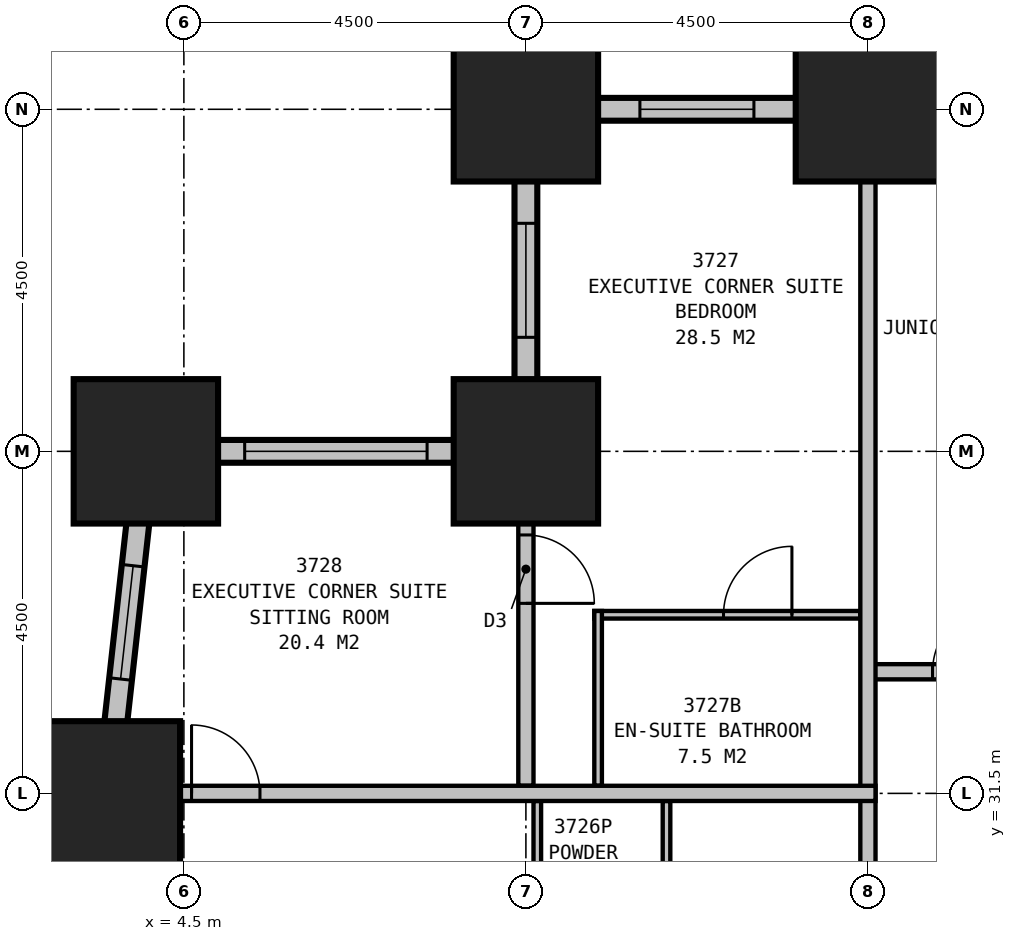
"""IFC4 building model, lengths in metres.
Left out: names, types, materials, properties, quantities, classifications, styles, units other than length and angle.
Written with IfcOpenShell. Run it as: python <this file> out.ifc"""

import sys

from ifc_helpers import new_model, si_unit, direction, frame, frame_2d, origin, origin_2d, place, context, subcontext, project, spatial, rectangle, extrude, element, fill, save


model = new_model("IFC4")
c1 = context("Model", 3, precision=1e-05, world=origin(), true_north=direction((0.0, 1.0)))
c2 = subcontext(c1, "Body", "Model", "MODEL_VIEW")
j1 = project(units=[si_unit("LENGTHUNIT", "METRE"), si_unit("PLANEANGLEUNIT", "RADIAN")], contexts=[c1])
p1 = place(None, origin())
s1 = spatial("IfcSite", under=j1, at=p1, CompositionType="ELEMENT")
p2 = place(p1, origin())
s2 = spatial("IfcBuilding", under=s1, at=p2, CompositionType="ELEMENT")
p3 = place(p2, frame((0.0, 0.0, 142.4)))
s3 = spatial("IfcBuildingStorey", under=s2, at=p3, CompositionType="ELEMENT", Elevation=142.4)
for number, where, z_axis, x_axis in (
    (1, (13.5, 40.5, 0.0), (0.0, 0.0, 1.0), (1.0, 0.0, 0.0)),
    (2, (9.0, 40.5, 0.0), (0.0, 0.0, 1.0), (1.0, 0.0, 0.0)),
    (3, (9.0, 36.0, 0.0), (0.0, 0.0, 1.0), (1.0, 0.0, 0.0)),
    (4, (4.0, 36.0, 0.0), (0.0, 0.0, 1.0), (1.0, 0.0, 0.0)),
    (5, (3.5, 31.5, 0.0), (0.0, 0.0, 1.0), (1.0, 0.0, 0.0)),
):
    element("IfcColumn", number, at=place(p3, frame(where, z_axis=z_axis, x_axis=x_axis)), inside=s3, PredefinedType="COLUMN", context=c2, shape_type="SweptSolid", body=[
        extrude(rectangle(XDim=1.9, YDim=1.9, at=origin_2d()), origin(), (0.0, 0.0, 1.0), 3.5),
    ])
p4 = place(p3, frame((40.65, 40.5, 0.0), z_axis=(0.0, 0.0, 1.0), x_axis=(-1.0, 0.0, 0.0)))
e6 = element("IfcWall", 6, at=p4, inside=s3, PredefinedType="STANDARD", context=c2, shape_type="SweptSolid", body=[
    extrude(rectangle(XDim=31.8, YDim=0.3, at=frame_2d((15.9, 0.0))), origin(), (0.0, 0.0, 1.0), 2.1),
])
p5 = place(p4, frame((1.65, 0.0, 0.5)))
e7 = element("IfcOpeningElement", 7, at=p5, cuts=e6, PredefinedType="OPENING", context=c2, shape_type="SweptSolid", body=[
    extrude(rectangle(XDim=1.5, YDim=1.4, at=frame_2d((0.75, 0.7))), frame((0.0, 0.16, 0.0), z_axis=(0.0, -1.0, 0.0), x_axis=(1.0, 0.0, 0.0)), (0.0, 0.0, 1.0), 0.32),
])
p6 = place(p4, frame((6.15, 0.0, 0.5)))
e8 = element("IfcOpeningElement", 8, at=p6, cuts=e6, PredefinedType="OPENING", context=c2, shape_type="SweptSolid", body=[
    extrude(rectangle(XDim=1.5, YDim=1.4, at=frame_2d((0.75, 0.7))), frame((0.0, 0.16, 0.0), z_axis=(0.0, -1.0, 0.0), x_axis=(1.0, 0.0, 0.0)), (0.0, 0.0, 1.0), 0.32),
])
p7 = place(p4, frame((10.65, 0.0, 0.5)))
e9 = element("IfcOpeningElement", 9, at=p7, cuts=e6, PredefinedType="OPENING", context=c2, shape_type="SweptSolid", body=[
    extrude(rectangle(XDim=1.5, YDim=1.4, at=frame_2d((0.75, 0.7))), frame((0.0, 0.16, 0.0), z_axis=(0.0, -1.0, 0.0), x_axis=(1.0, 0.0, 0.0)), (0.0, 0.0, 1.0), 0.32),
])
p8 = place(p4, frame((15.15, 0.0, 0.5)))
e10 = element("IfcOpeningElement", 10, at=p8, cuts=e6, PredefinedType="OPENING", context=c2, shape_type="SweptSolid", body=[
    extrude(rectangle(XDim=1.5, YDim=1.4, at=frame_2d((0.75, 0.7))), frame((0.0, 0.16, 0.0), z_axis=(0.0, -1.0, 0.0), x_axis=(1.0, 0.0, 0.0)), (0.0, 0.0, 1.0), 0.32),
])
p9 = place(p4, frame((19.65, 0.0, 0.5)))
e11 = element("IfcOpeningElement", 11, at=p9, cuts=e6, PredefinedType="OPENING", context=c2, shape_type="SweptSolid", body=[
    extrude(rectangle(XDim=1.5, YDim=1.4, at=frame_2d((0.75, 0.7))), frame((0.0, 0.16, 0.0), z_axis=(0.0, -1.0, 0.0), x_axis=(1.0, 0.0, 0.0)), (0.0, 0.0, 1.0), 0.32),
])
p10 = place(p4, frame((24.15, 0.0, 0.5)))
e12 = element("IfcOpeningElement", 12, at=p10, cuts=e6, PredefinedType="OPENING", context=c2, shape_type="SweptSolid", body=[
    extrude(rectangle(XDim=1.5, YDim=1.4, at=frame_2d((0.75, 0.7))), frame((0.0, 0.16, 0.0), z_axis=(0.0, -1.0, 0.0), x_axis=(1.0, 0.0, 0.0)), (0.0, 0.0, 1.0), 0.32),
])
p11 = place(p4, frame((28.65, 0.0, 0.5)))
e13 = element("IfcOpeningElement", 13, at=p11, cuts=e6, PredefinedType="OPENING", context=c2, shape_type="SweptSolid", body=[
    extrude(rectangle(XDim=1.5, YDim=1.4, at=frame_2d((0.75, 0.7))), frame((0.0, 0.16, 0.0), z_axis=(0.0, -1.0, 0.0), x_axis=(1.0, 0.0, 0.0)), (0.0, 0.0, 1.0), 0.32),
])
p12 = place(p3, frame((9.0, 40.65, 0.0), z_axis=(0.0, 0.0, 1.0), x_axis=(0.0, -1.0, 0.0)))
e14 = element("IfcWall", 14, at=p12, inside=s3, PredefinedType="STANDARD", context=c2, shape_type="SweptSolid", body=[
    extrude(rectangle(XDim=4.8, YDim=0.3, at=frame_2d((2.4, 0.0))), origin(), (0.0, 0.0, 1.0), 2.1),
])
p13 = place(p12, frame((1.65, 0.0, 0.5)))
e15 = element("IfcOpeningElement", 15, at=p13, cuts=e14, PredefinedType="OPENING", context=c2, shape_type="SweptSolid", body=[
    extrude(rectangle(XDim=1.5, YDim=1.4, at=frame_2d((0.75, 0.7))), frame((0.0, 0.16, 0.0), z_axis=(0.0, -1.0, 0.0), x_axis=(1.0, 0.0, 0.0)), (0.0, 0.0, 1.0), 0.32),
])
p14 = place(p3, frame((9.15, 36.0, 0.0), z_axis=(0.0, 0.0, 1.0), x_axis=(-1.0, 0.0, 0.0)))
e16 = element("IfcWall", 16, at=p14, inside=s3, PredefinedType="STANDARD", context=c2, shape_type="SweptSolid", body=[
    extrude(rectangle(XDim=5.3, YDim=0.3, at=frame_2d((2.65, 0.0))), origin(), (0.0, 0.0, 1.0), 2.1),
])
p15 = place(p14, frame((1.45, 0.0, 0.5)))
e17 = element("IfcOpeningElement", 17, at=p15, cuts=e16, PredefinedType="OPENING", context=c2, shape_type="SweptSolid", body=[
    extrude(rectangle(XDim=2.4, YDim=1.4, at=frame_2d((1.2, 0.7))), frame((0.0, 0.16, 0.0), z_axis=(0.0, -1.0, 0.0), x_axis=(1.0, 0.0, 0.0)), (0.0, 0.0, 1.0), 0.32),
])
p16 = place(p3, frame((4.017, 36.149, 0.0), z_axis=(0.0, 0.0, 1.0), x_axis=(-0.110433201132, -0.993883548555, 0.0)))
e18 = element("IfcWall", 18, at=p16, inside=s3, PredefinedType="STANDARD", context=c2, shape_type="SweptSolid", body=[
    extrude(rectangle(XDim=31.994, YDim=0.3, at=frame_2d((15.997, 0.0))), origin(), (0.0, 0.0, 1.0), 2.1),
])
p17 = place(p16, frame((1.664, 0.0, 0.5)))
e19 = element("IfcOpeningElement", 19, at=p17, cuts=e18, PredefinedType="OPENING", context=c2, shape_type="SweptSolid", body=[
    extrude(rectangle(XDim=1.5, YDim=1.4, at=frame_2d((0.75, 0.7))), frame((0.0, 0.16, 0.0), z_axis=(0.0, -1.0, 0.0), x_axis=(1.0, 0.0, 0.0)), (0.0, 0.0, 1.0), 0.32),
])
p18 = place(p16, frame((6.192, 0.0, 0.5)))
e20 = element("IfcOpeningElement", 20, at=p18, cuts=e18, PredefinedType="OPENING", context=c2, shape_type="SweptSolid", body=[
    extrude(rectangle(XDim=1.5, YDim=1.4, at=frame_2d((0.75, 0.7))), frame((0.0, 0.16, 0.0), z_axis=(0.0, -1.0, 0.0), x_axis=(1.0, 0.0, 0.0)), (0.0, 0.0, 1.0), 0.32),
])
p19 = place(p16, frame((10.719, 0.0, 0.5)))
e21 = element("IfcOpeningElement", 21, at=p19, cuts=e18, PredefinedType="OPENING", context=c2, shape_type="SweptSolid", body=[
    extrude(rectangle(XDim=1.5, YDim=1.4, at=frame_2d((0.75, 0.7))), frame((0.0, 0.16, 0.0), z_axis=(0.0, -1.0, 0.0), x_axis=(1.0, 0.0, 0.0)), (0.0, 0.0, 1.0), 0.32),
])
p20 = place(p16, frame((15.247, 0.0, 0.5)))
e22 = element("IfcOpeningElement", 22, at=p20, cuts=e18, PredefinedType="OPENING", context=c2, shape_type="SweptSolid", body=[
    extrude(rectangle(XDim=1.5, YDim=1.4, at=frame_2d((0.75, 0.7))), frame((0.0, 0.16, 0.0), z_axis=(0.0, -1.0, 0.0), x_axis=(1.0, 0.0, 0.0)), (0.0, 0.0, 1.0), 0.32),
])
p21 = place(p16, frame((19.775, 0.0, 0.5)))
e23 = element("IfcOpeningElement", 23, at=p21, cuts=e18, PredefinedType="OPENING", context=c2, shape_type="SweptSolid", body=[
    extrude(rectangle(XDim=1.5, YDim=1.4, at=frame_2d((0.75, 0.7))), frame((0.0, 0.16, 0.0), z_axis=(0.0, -1.0, 0.0), x_axis=(1.0, 0.0, 0.0)), (0.0, 0.0, 1.0), 0.32),
])
p22 = place(p16, frame((24.302, 0.0, 0.5)))
e24 = element("IfcOpeningElement", 24, at=p22, cuts=e18, PredefinedType="OPENING", context=c2, shape_type="SweptSolid", body=[
    extrude(rectangle(XDim=1.5, YDim=1.4, at=frame_2d((0.75, 0.7))), frame((0.0, 0.16, 0.0), z_axis=(0.0, -1.0, 0.0), x_axis=(1.0, 0.0, 0.0)), (0.0, 0.0, 1.0), 0.32),
])
p23 = place(p16, frame((28.83, 0.0, 0.5)))
e25 = element("IfcOpeningElement", 25, at=p23, cuts=e18, PredefinedType="OPENING", context=c2, shape_type="SweptSolid", body=[
    extrude(rectangle(XDim=1.5, YDim=1.4, at=frame_2d((0.75, 0.7))), frame((0.0, 0.16, 0.0), z_axis=(0.0, -1.0, 0.0), x_axis=(1.0, 0.0, 0.0)), (0.0, 0.0, 1.0), 0.32),
])
p24 = place(p3, frame((13.5, 33.1, 0.0), z_axis=(0.0, 0.0, 1.0), x_axis=(1.0, 0.0, 0.0)))
e26 = element("IfcWall", 26, at=p24, inside=s3, PredefinedType="PARTITIONING", context=c2, shape_type="SweptSolid", body=[
    extrude(rectangle(XDim=22.5, YDim=0.2, at=frame_2d((11.25, 0.0))), origin(), (0.0, 0.0, 1.0), 3.25),
])
p25 = place(p24, frame((0.85, 0.0, 0.0)))
e27 = element("IfcOpeningElement", 27, at=p25, cuts=e26, PredefinedType="OPENING", context=c2, shape_type="SweptSolid", body=[
    extrude(rectangle(XDim=0.9, YDim=2.1, at=frame_2d((0.45, 1.05))), frame((0.0, 0.11, 0.0), z_axis=(0.0, -1.0, 0.0), x_axis=(1.0, 0.0, 0.0)), (0.0, 0.0, 1.0), 0.22),
])
p26 = place(p24, frame((10.7, 0.0, 0.0)))
e28 = element("IfcOpeningElement", 28, at=p26, cuts=e26, PredefinedType="OPENING", context=c2, shape_type="SweptSolid", body=[
    extrude(rectangle(XDim=1.0, YDim=2.1, at=frame_2d((0.5, 1.05))), frame((0.0, 0.11, 0.0), z_axis=(0.0, -1.0, 0.0), x_axis=(1.0, 0.0, 0.0)), (0.0, 0.0, 1.0), 0.22),
])
p27 = place(p24, frame((15.15, 0.0, 0.0)))
e29 = element("IfcOpeningElement", 29, at=p27, cuts=e26, PredefinedType="OPENING", context=c2, shape_type="SweptSolid", body=[
    extrude(rectangle(XDim=0.9, YDim=2.1, at=frame_2d((0.45, 1.05))), frame((0.0, 0.11, 0.0), z_axis=(0.0, -1.0, 0.0), x_axis=(1.0, 0.0, 0.0)), (0.0, 0.0, 1.0), 0.22),
])
p28 = place(p3, frame((13.5, 29.3, 0.0), z_axis=(0.0, 0.0, 1.0), x_axis=(0.0, 1.0, 0.0)))
e30 = element("IfcWall", 30, at=p28, inside=s3, PredefinedType="PARTITIONING", context=c2, shape_type="SweptSolid", body=[
    extrude(rectangle(XDim=11.2, YDim=0.2, at=frame_2d((5.6, 0.0))), origin(), (0.0, 0.0, 1.0), 2.2),
])
p29 = place(p3, frame((13.6, 31.5, 0.0), z_axis=(0.0, 0.0, 1.0), x_axis=(-1.0, 0.0, 0.0)))
e31 = element("IfcWall", 31, at=p29, inside=s3, PredefinedType="PARTITIONING", context=c2, shape_type="SweptSolid", body=[
    extrude(rectangle(XDim=10.099, YDim=0.2, at=frame_2d((5.05, 0.0))), origin(), (0.0, 0.0, 1.0), 3.25),
])
p30 = place(p29, frame((8.999, 0.0, 0.0), z_axis=(0.0, 0.0, 1.0), x_axis=(-1.0, 0.0, 0.0)))
e32 = element("IfcOpeningElement", 32, at=p30, cuts=e31, PredefinedType="OPENING", context=c2, shape_type="SweptSolid", body=[
    extrude(rectangle(XDim=0.9, YDim=2.1, at=frame_2d((0.45, 1.05))), frame((0.0, 0.11, 0.0), z_axis=(0.0, -1.0, 0.0), x_axis=(1.0, 0.0, 0.0)), (0.0, 0.0, 1.0), 0.22),
])
p31 = place(p3, frame((9.15, 31.4, 0.0), z_axis=(0.0, 0.0, 1.0), x_axis=(0.0, -1.0, 0.0)))
e33 = element("IfcWall", 33, at=p31, inside=s3, PredefinedType="PLUMBINGWALL", context=c2, shape_type="SweptSolid", body=[
    extrude(rectangle(XDim=2.0, YDim=0.1, at=frame_2d((1.0, 0.0))), origin(), (0.0, 0.0, 1.0), 2.2),
])
p32 = place(p3, frame((10.85, 31.4, 0.0), z_axis=(0.0, 0.0, 1.0), x_axis=(0.0, -1.0, 0.0)))
e34 = element("IfcWall", 34, at=p32, inside=s3, PredefinedType="PLUMBINGWALL", context=c2, shape_type="SweptSolid", body=[
    extrude(rectangle(XDim=2.0, YDim=0.1, at=frame_2d((1.0, 0.0))), origin(), (0.0, 0.0, 1.0), 3.25),
])
p33 = place(p3, frame((9.0, 31.6, 0.0), z_axis=(0.0, 0.0, 1.0), x_axis=(0.0, 1.0, 0.0)))
e35 = element("IfcWall", 35, at=p33, inside=s3, PredefinedType="PARTITIONING", context=c2, shape_type="SweptSolid", body=[
    extrude(rectangle(XDim=4.4, YDim=0.2, at=frame_2d((2.2, 0.0))), origin(), (0.0, 0.0, 1.0), 2.2),
])
p34 = place(p33, frame((3.3, 0.0, 0.0), z_axis=(0.0, 0.0, 1.0), x_axis=(-1.0, 0.0, 0.0)))
e36 = element("IfcOpeningElement", 36, at=p34, cuts=e35, PredefinedType="OPENING", context=c2, shape_type="SweptSolid", body=[
    extrude(rectangle(XDim=0.9, YDim=2.1, at=frame_2d((0.45, 1.05))), frame((0.0, 0.11, 0.0), z_axis=(0.0, -1.0, 0.0), x_axis=(1.0, 0.0, 0.0)), (0.0, 0.0, 1.0), 0.22),
])
p35 = place(p3, frame((9.95, 31.6, 0.0), z_axis=(0.0, 0.0, 1.0), x_axis=(0.0, 1.0, 0.0)))
e37 = element("IfcWall", 37, at=p35, inside=s3, PredefinedType="PLUMBINGWALL", context=c2, shape_type="SweptSolid", body=[
    extrude(rectangle(XDim=2.3, YDim=0.1, at=frame_2d((1.15, 0.0))), origin(), (0.0, 0.0, 1.0), 3.25),
])
p36 = place(p3, frame((13.4, 33.85, 0.0), z_axis=(0.0, 0.0, 1.0), x_axis=(-1.0, 0.0, 0.0)))
e38 = element("IfcWall", 38, at=p36, inside=s3, PredefinedType="PLUMBINGWALL", context=c2, shape_type="SweptSolid", body=[
    extrude(rectangle(XDim=3.5, YDim=0.1, at=frame_2d((1.75, 0.0))), origin(), (0.0, 0.0, 1.0), 3.25),
])
p37 = place(p36, frame((1.8, 0.0, 0.0), z_axis=(0.0, 0.0, 1.0), x_axis=(-1.0, 0.0, 0.0)))
e39 = element("IfcOpeningElement", 39, at=p37, cuts=e38, PredefinedType="OPENING", context=c2, shape_type="SweptSolid", body=[
    extrude(rectangle(XDim=0.9, YDim=2.1, at=frame_2d((0.45, 1.05))), frame((0.0, 0.06, 0.0), z_axis=(0.0, -1.0, 0.0), x_axis=(1.0, 0.0, 0.0)), (0.0, 0.0, 1.0), 0.12),
])
p38 = place(p11, origin())
e40 = element("IfcWindow", 40, at=p38, inside=s3, PartitioningType="SINGLE_PANEL", PredefinedType="WINDOW", context=c2, shape_type="SweptSolid", body=[
    extrude(rectangle(XDim=1.5, YDim=1.4, at=frame_2d((0.75, 0.7))), frame((0.0, 0.03, 0.0), z_axis=(0.0, -1.0, 0.0), x_axis=(1.0, 0.0, 0.0)), (0.0, 0.0, 1.0), 0.06),
])
fill(e13, e40)
p39 = place(p13, origin())
e41 = element("IfcWindow", 41, at=p39, inside=s3, PartitioningType="SINGLE_PANEL", PredefinedType="WINDOW", context=c2, shape_type="SweptSolid", body=[
    extrude(rectangle(XDim=1.5, YDim=1.4, at=frame_2d((0.75, 0.7))), frame((0.0, 0.03, 0.0), z_axis=(0.0, -1.0, 0.0), x_axis=(1.0, 0.0, 0.0)), (0.0, 0.0, 1.0), 0.06),
])
fill(e15, e41)
p40 = place(p15, origin())
e42 = element("IfcWindow", 42, at=p40, inside=s3, PartitioningType="SINGLE_PANEL", PredefinedType="WINDOW", context=c2, shape_type="SweptSolid", body=[
    extrude(rectangle(XDim=2.4, YDim=1.4, at=frame_2d((1.2, 0.7))), frame((0.0, 0.03, 0.0), z_axis=(0.0, -1.0, 0.0), x_axis=(1.0, 0.0, 0.0)), (0.0, 0.0, 1.0), 0.06),
])
fill(e17, e42)
p41 = place(p17, origin())
e43 = element("IfcWindow", 43, at=p41, inside=s3, PartitioningType="SINGLE_PANEL", PredefinedType="WINDOW", context=c2, shape_type="SweptSolid", body=[
    extrude(rectangle(XDim=1.5, YDim=1.4, at=frame_2d((0.75, 0.7))), frame((0.0, 0.03, 0.0), z_axis=(0.0, -1.0, 0.0), x_axis=(1.0, 0.0, 0.0)), (0.0, 0.0, 1.0), 0.06),
])
fill(e19, e43)
p42 = place(p25, origin())
e44 = element("IfcDoor", 44, at=p42, inside=s3, OperationType="SINGLE_SWING_RIGHT", PredefinedType="DOOR", context=c2, shape_type="SweptSolid", body=[
    extrude(rectangle(XDim=0.9, YDim=2.1, at=frame_2d((0.45, 1.05))), frame((0.0, 0.025, 0.0), z_axis=(0.0, -1.0, 0.0), x_axis=(1.0, 0.0, 0.0)), (0.0, 0.0, 1.0), 0.05),
])
fill(e27, e44)
p43 = place(p30, origin())
e45 = element("IfcDoor", 45, at=p43, inside=s3, OperationType="SINGLE_SWING_LEFT", PredefinedType="DOOR", context=c2, shape_type="SweptSolid", body=[
    extrude(rectangle(XDim=0.9, YDim=2.1, at=frame_2d((0.45, 1.05))), frame((0.0, 0.025, 0.0), z_axis=(0.0, -1.0, 0.0), x_axis=(1.0, 0.0, 0.0)), (0.0, 0.0, 1.0), 0.05),
])
fill(e32, e45)
p44 = place(p34, origin())
e46 = element("IfcDoor", 46, at=p44, inside=s3, OperationType="SINGLE_SWING_RIGHT", PredefinedType="DOOR", context=c2, shape_type="SweptSolid", body=[
    extrude(rectangle(XDim=0.9, YDim=2.1, at=frame_2d((0.45, 1.05))), frame((0.0, 0.025, 0.0), z_axis=(0.0, -1.0, 0.0), x_axis=(1.0, 0.0, 0.0)), (0.0, 0.0, 1.0), 0.05),
])
fill(e36, e46)
p45 = place(p37, origin())
e47 = element("IfcDoor", 47, at=p45, inside=s3, OperationType="SINGLE_SWING_RIGHT", PredefinedType="DOOR", context=c2, shape_type="SweptSolid", body=[
    extrude(rectangle(XDim=0.9, YDim=2.1, at=frame_2d((0.45, 1.05))), frame((0.0, 0.025, 0.0), z_axis=(0.0, -1.0, 0.0), x_axis=(1.0, 0.0, 0.0)), (0.0, 0.0, 1.0), 0.05),
])
fill(e39, e47)
save(model, sys.argv[1])
